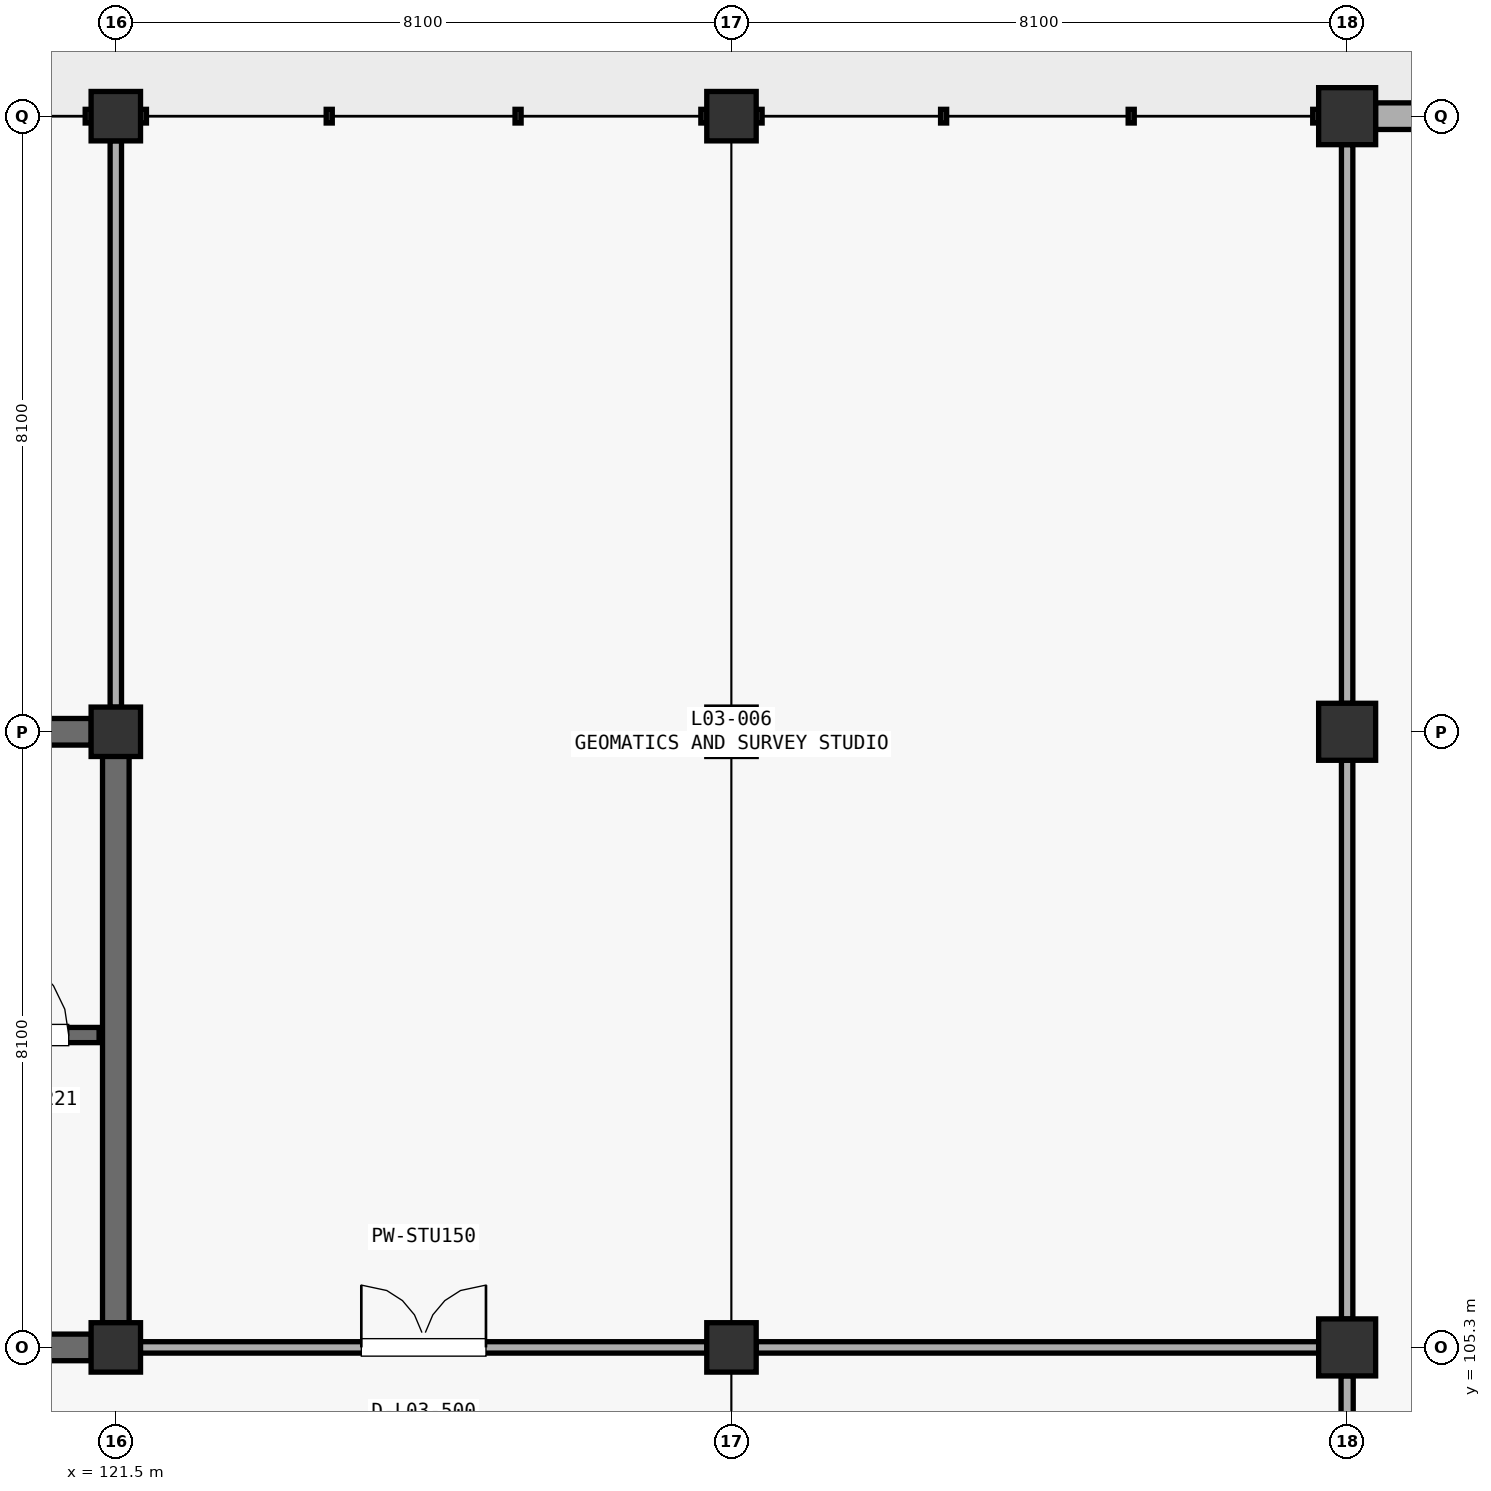
"""IFC4 building model, lengths in metres.
Left out: names, types, materials, properties, quantities, classifications, styles, units other than length and angle.
Written with IfcOpenShell. Run it as: python <this file> out.ifc"""

import sys

from ifc_helpers import new_model, si_unit, direction, frame, frame_2d, origin, origin_2d, place, context, subcontext, project, spatial, polyline, rectangle, outline, extrude, element, fill, save


model = new_model("IFC4")
c1 = context("Model", 3, precision=1e-05, world=origin(), true_north=direction((0.0, 1.0)))
c2 = subcontext(c1, "Body", "Model", "MODEL_VIEW")
j1 = project(units=[si_unit("LENGTHUNIT", "METRE"), si_unit("PLANEANGLEUNIT", "RADIAN")], contexts=[c1])
p1 = place(None, origin())
s1 = spatial("IfcSite", under=j1, at=p1, CompositionType="ELEMENT")
p2 = place(p1, origin())
s2 = spatial("IfcBuilding", under=s1, at=p2, CompositionType="ELEMENT")
p3 = place(p2, frame((0.0, 0.0, 14.11)))
s3 = spatial("IfcBuildingStorey", under=s2, at=p3, CompositionType="ELEMENT", Elevation=14.11)
for number, where, z_axis, x_axis in (
    (1, (121.5, 105.3, 0.0), (0.0, 0.0, 1.0), (1.0, 0.0, 0.0)),
    (2, (121.5, 113.4, 0.0), (0.0, 0.0, 1.0), (1.0, 0.0, 0.0)),
    (3, (121.5, 121.5, 0.0), (0.0, 0.0, 1.0), (1.0, 0.0, 0.0)),
    (4, (129.6, 105.3, 0.0), (0.0, 0.0, 1.0), (1.0, 0.0, 0.0)),
    (5, (129.6, 113.4, 0.0), (0.0, 0.0, 1.0), (1.0, 0.0, 0.0)),
    (6, (129.6, 121.5, 0.0), (0.0, 0.0, 1.0), (1.0, 0.0, 0.0)),
):
    element("IfcColumn", number, at=place(p3, frame(where, z_axis=z_axis, x_axis=x_axis)), inside=s3, PredefinedType="COLUMN", context=c2, shape_type="SweptSolid", body=[
        extrude(rectangle(XDim=0.65, YDim=0.65, at=origin_2d()), origin(), (0.0, 0.0, 1.0), 4.42),
    ])
for number, where, z_axis, x_axis in (
    (7, (137.7, 105.3, 0.0), (0.0, 0.0, 1.0), (1.0, 0.0, 0.0)),
    (8, (137.7, 113.4, 0.0), (0.0, 0.0, 1.0), (1.0, 0.0, 0.0)),
    (9, (137.7, 121.5, 0.0), (0.0, 0.0, 1.0), (1.0, 0.0, 0.0)),
):
    element("IfcColumn", number, at=place(p3, frame(where, z_axis=z_axis, x_axis=x_axis)), inside=s3, PredefinedType="COLUMN", context=c2, shape_type="SweptSolid", body=[
        extrude(rectangle(XDim=0.75, YDim=0.75, at=origin_2d()), origin(), (0.0, 0.0, 1.0), 4.42),
    ])
p4 = place(p3, frame((113.417, 121.51, -0.35), z_axis=(0.0, 0.0, 1.0), x_axis=(0.86956831127, 0.49381266897, 0.0)))
e10 = element("IfcWall", 10, at=p4, inside=s3, PredefinedType="STANDARD", context=c2, shape_type="SweptSolid", body=[
    extrude(outline(polyline([(0.0, 0.0), (9.275, 0.0), (9.275, 2.21), (0.0, 0.36), (0.0, 0.0)])), frame((0.0, 0.13, 0.0), z_axis=(0.0, -1.0, 0.0), x_axis=(1.0, 0.0, 0.0)), (0.0, 0.0, 1.0), 0.26),
])
p5 = place(p3, frame((137.718, 125.491, -0.35), z_axis=(0.0, 0.0, 1.0), x_axis=(0.89662055287, -0.442799711124, 0.0)))
e11 = element("IfcWall", 11, at=p5, inside=s3, PredefinedType="STANDARD", context=c2, shape_type="SweptSolid", body=[
    extrude(outline(polyline([(0.0, 0.0), (8.994, 0.0), (8.994, 0.36), (0.0, 1.969), (0.0, 0.0)])), frame((0.0, 0.13, 0.0), z_axis=(0.0, -1.0, 0.0), x_axis=(1.0, 0.0, 0.0)), (0.0, 0.0, 1.0), 0.26),
])
p6 = place(p3, frame((138.073, 121.5, 0.0), z_axis=(0.0, 0.0, 1.0), x_axis=(1.0, 0.0, 0.0)))
e12 = element("IfcWall", 12, at=p6, inside=s3, PredefinedType="STANDARD", context=c2, shape_type="SweptSolid", body=[
    extrude(rectangle(XDim=7.354, YDim=0.35, at=frame_2d((3.677, 0.0))), origin(), (0.0, 0.0, 1.0), 3.512),
])
p7 = place(p6, frame((2.227, 0.0, 0.85)))
e13 = element("IfcOpeningElement", 13, at=p7, cuts=e12, PredefinedType="OPENING", context=c2, shape_type="SweptSolid", body=[
    extrude(rectangle(XDim=2.9, YDim=1.6, at=frame_2d((1.45, 0.8))), frame((0.0, 0.185, 0.0), z_axis=(0.0, -1.0, 0.0), x_axis=(1.0, 0.0, 0.0)), (0.0, 0.0, 1.0), 0.37),
])
p8 = place(p3, frame((113.723, 113.4, 0.0), z_axis=(0.0, 0.0, 1.0), x_axis=(1.0, 0.0, 0.0)))
e14 = element("IfcWall", 14, at=p8, inside=s3, PredefinedType="SHEAR", context=c2, shape_type="SweptSolid", body=[
    extrude(rectangle(XDim=7.454, YDim=0.35, at=frame_2d((3.727, 0.0))), origin(), (0.0, 0.0, 1.0), 4.152),
])
p9 = place(p3, frame((121.5, 105.623, 0.0), z_axis=(0.0, 0.0, 1.0), x_axis=(0.0, 1.0, 0.0)))
e15 = element("IfcWall", 15, at=p9, inside=s3, PredefinedType="SHEAR", context=c2, shape_type="SweptSolid", body=[
    extrude(rectangle(XDim=7.454, YDim=0.35, at=frame_2d((3.727, 0.0))), origin(), (0.0, 0.0, 1.0), 4.152),
])
p10 = place(p3, frame((113.723, 105.3, 0.0), z_axis=(0.0, 0.0, 1.0), x_axis=(1.0, 0.0, 0.0)))
e16 = element("IfcWall", 16, at=p10, inside=s3, PredefinedType="SHEAR", context=c2, shape_type="SweptSolid", body=[
    extrude(rectangle(XDim=7.454, YDim=0.35, at=frame_2d((3.727, 0.0))), origin(), (0.0, 0.0, 1.0), 4.152),
])
p11 = place(p10, frame((5.204, 0.0, 0.0)))
e17 = element("IfcOpeningElement", 17, at=p11, cuts=e16, PredefinedType="OPENING", context=c2, shape_type="SweptSolid", body=[
    extrude(rectangle(XDim=1.2, YDim=2.2, at=frame_2d((0.6, 1.1))), frame((0.0, 0.185, 0.0), z_axis=(0.0, -1.0, 0.0), x_axis=(1.0, 0.0, 0.0)), (0.0, 0.0, 1.0), 0.37),
])
p12 = place(p3, frame((113.62, 109.41, 0.0), z_axis=(0.0, 0.0, 1.0), x_axis=(1.0, 0.0, 0.0)))
e18 = element("IfcWall", 18, at=p12, inside=s3, PredefinedType="SHEAR", context=c2, shape_type="SweptSolid", body=[
    extrude(rectangle(XDim=7.66, YDim=0.2, at=frame_2d((3.83, 0.0))), origin(), (0.0, 0.0, 1.0), 4.152),
])
p13 = place(p12, frame((6.11, 0.0, 0.0)))
e19 = element("IfcOpeningElement", 19, at=p13, cuts=e18, PredefinedType="OPENING", context=c2, shape_type="SweptSolid", body=[
    extrude(rectangle(XDim=1.15, YDim=2.2, at=frame_2d((0.575, 1.1))), frame((0.0, 0.11, 0.0), z_axis=(0.0, -1.0, 0.0), x_axis=(1.0, 0.0, 0.0)), (0.0, 0.0, 1.0), 0.22),
])
p14 = place(p3, frame((121.823, 105.3, 0.0), z_axis=(0.0, 0.0, 1.0), x_axis=(1.0, 0.0, 0.0)))
e20 = element("IfcWall", 20, at=p14, inside=s3, PredefinedType="PARTITIONING", context=c2, shape_type="SweptSolid", body=[
    extrude(rectangle(XDim=7.454, YDim=0.15, at=frame_2d((3.727, 0.0))), origin(), (0.0, 0.0, 1.0), 3.552),
])
p15 = place(p14, frame((2.907, 0.0, 0.0)))
e21 = element("IfcOpeningElement", 21, at=p15, cuts=e20, PredefinedType="OPENING", context=c2, shape_type="SweptSolid", body=[
    extrude(rectangle(XDim=1.64, YDim=2.25, at=frame_2d((0.82, 1.125))), frame((0.0, 0.085, 0.0), z_axis=(0.0, -1.0, 0.0), x_axis=(1.0, 0.0, 0.0)), (0.0, 0.0, 1.0), 0.17),
])
p16 = place(p3, frame((129.923, 105.3, 0.0), z_axis=(0.0, 0.0, 1.0), x_axis=(1.0, 0.0, 0.0)))
e22 = element("IfcWall", 22, at=p16, inside=s3, PredefinedType="PARTITIONING", context=c2, shape_type="SweptSolid", body=[
    extrude(rectangle(XDim=7.404, YDim=0.15, at=frame_2d((3.702, 0.0))), origin(), (0.0, 0.0, 1.0), 3.302),
])
p17 = place(p3, frame((137.7, 105.673, 0.0), z_axis=(0.0, 0.0, 1.0), x_axis=(0.0, 1.0, 0.0)))
e23 = element("IfcWall", 23, at=p17, inside=s3, PredefinedType="PARTITIONING", context=c2, shape_type="SweptSolid", body=[
    extrude(rectangle(XDim=7.354, YDim=0.15, at=frame_2d((3.677, 0.0))), origin(), (0.0, 0.0, 1.0), 3.502),
])
p18 = place(p3, frame((137.7, 113.773, 0.0), z_axis=(0.0, 0.0, 1.0), x_axis=(0.0, 1.0, 0.0)))
e24 = element("IfcWall", 24, at=p18, inside=s3, PredefinedType="PARTITIONING", context=c2, shape_type="SweptSolid", body=[
    extrude(rectangle(XDim=7.354, YDim=0.15, at=frame_2d((3.677, 0.0))), origin(), (0.0, 0.0, 1.0), 3.552),
])
p19 = place(p3, frame((121.5, 113.723, 0.0), z_axis=(0.0, 0.0, 1.0), x_axis=(0.0, 1.0, 0.0)))
e25 = element("IfcWall", 25, at=p19, inside=s3, PredefinedType="PARTITIONING", context=c2, shape_type="SweptSolid", body=[
    extrude(rectangle(XDim=7.454, YDim=0.15, at=frame_2d((3.727, 0.0))), origin(), (0.0, 0.0, 1.0), 3.302),
])
p20 = place(p3, frame((137.7, 97.573, 0.0), z_axis=(0.0, 0.0, 1.0), x_axis=(0.0, 1.0, 0.0)))
e26 = element("IfcWall", 26, at=p20, inside=s3, PredefinedType="PARTITIONING", context=c2, shape_type="SweptSolid", body=[
    extrude(rectangle(XDim=7.354, YDim=0.16, at=frame_2d((3.677, 0.0))), origin(), (0.0, 0.0, 1.0), 3.402),
])
p21 = place(p13, origin())
e27 = element("IfcDoor", 27, at=p21, inside=s3, OperationType="SINGLE_SWING_LEFT", PredefinedType="DOOR", context=c2, shape_type="SweptSolid", body=[
    extrude(rectangle(XDim=1.15, YDim=2.2, at=frame_2d((0.575, 1.1))), frame((0.0, 0.025, 0.0), z_axis=(0.0, -1.0, 0.0), x_axis=(1.0, 0.0, 0.0)), (0.0, 0.0, 1.0), 0.05),
])
fill(e19, e27)
p22 = place(p15, origin())
e28 = element("IfcDoor", 28, at=p22, inside=s3, OperationType="DOUBLE_SWING_LEFT", PredefinedType="DOOR", context=c2, shape_type="SweptSolid", body=[
    extrude(rectangle(XDim=1.64, YDim=2.25, at=frame_2d((0.82, 1.125))), frame((0.0, 0.025, 0.0), z_axis=(0.0, -1.0, 0.0), x_axis=(1.0, 0.0, 0.0)), (0.0, 0.0, 1.0), 0.05),
])
fill(e21, e28)
save(model, sys.argv[1])
